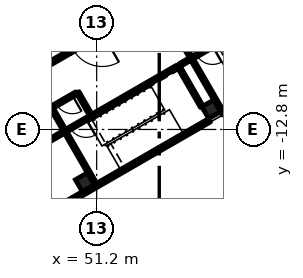
"""IFC4 building model, lengths in metres.
Left out: names, types, materials, properties, quantities, classifications, styles, units other than length and angle.
Written with IfcOpenShell. Run it as: python <this file> out.ifc"""

import sys

from ifc_helpers import new_model, si_unit, direction, frame, frame_2d, origin, origin_2d, place, context, subcontext, project, spatial, rectangle, extrude, element, fill, save


model = new_model("IFC4")
c1 = context("Model", 3, precision=1e-05, world=origin(), true_north=direction((0.0, 1.0)))
c2 = subcontext(c1, "Body", "Model", "MODEL_VIEW")
j1 = project(units=[si_unit("LENGTHUNIT", "METRE"), si_unit("PLANEANGLEUNIT", "RADIAN")], contexts=[c1])
p1 = place(None, origin())
s1 = spatial("IfcSite", under=j1, at=p1, CompositionType="ELEMENT")
p2 = place(p1, origin())
s2 = spatial("IfcBuilding", under=s1, at=p2, CompositionType="ELEMENT")
p3 = place(p2, frame((0.0, 0.0, 6.0)))
s3 = spatial("IfcBuildingStorey", under=s2, at=p3, CompositionType="ELEMENT", Elevation=6.0)
for number, where, z_axis, x_axis in (
    (1, (50.418, -16.271, 0.0), (0.0, 0.0, 1.0), (-0.5, 0.866, 0.0)),
    (2, (58.732, -11.471, 0.0), (0.0, 0.0, 1.0), (-0.5, 0.866, 0.0)),
):
    element("IfcColumn", number, at=place(p3, frame(where, z_axis=z_axis, x_axis=x_axis)), inside=s3, PredefinedType="COLUMN", context=c2, shape_type="SweptSolid", body=[
        extrude(rectangle(XDim=0.9, YDim=0.9, at=origin_2d()), origin(), (0.0, 0.0, 1.0), 5.4),
    ])
p4 = place(p3, frame((58.63, -12.194, 0.0), z_axis=(0.0, 0.0, 1.0), x_axis=(-0.866027159341, -0.499996959274, 0.0)))
e3 = element("IfcWall", 3, at=p4, inside=s3, PredefinedType="SOLIDWALL", context=c2, shape_type="SweptSolid", body=[
    extrude(rectangle(XDim=11.625, YDim=0.25, at=frame_2d((5.812, 0.0))), origin(), (0.0, 0.0, 1.0), 5.1),
])
p5 = place(p3, frame((66.944, -7.394, 0.0), z_axis=(0.0, 0.0, 1.0), x_axis=(-0.866033360935, -0.499986217557, 0.0)))
e4 = element("IfcWall", 4, at=p5, inside=s3, PredefinedType="SOLIDWALL", context=c2, shape_type="SweptSolid", body=[
    extrude(rectangle(XDim=8.6, YDim=0.25, at=frame_2d((4.3, 0.0))), origin(), (0.0, 0.0, 1.0), 5.1),
])
p6 = place(p3, frame((59.496, -11.694, 0.0), z_axis=(0.0, 0.0, 1.0), x_axis=(-0.865982457891, -0.500074377092, 0.0)))
e5 = element("IfcWall", 5, at=p6, inside=s3, PredefinedType="SOLIDWALL", context=c2, shape_type="SweptSolid", body=[
    extrude(rectangle(XDim=0.1, YDim=0.25, at=frame_2d((0.05, 0.0))), origin(), (0.0, 0.0, 1.0), 5.1),
])
p7 = place(p3, frame((51.119, -16.385, 0.0), z_axis=(0.0, 0.0, 1.0), x_axis=(-0.49999894854, 0.866026010844, 0.0)))
e6 = element("IfcWall", 6, at=p7, inside=s3, PredefinedType="SOLIDWALL", context=c2, shape_type="SweptSolid", body=[
    extrude(rectangle(XDim=4.0, YDim=0.2, at=frame_2d((2.0, 0.0))), origin(), (0.0, 0.0, 1.0), 5.1),
])
p8 = place(p3, frame((58.117, -11.306, 0.0), z_axis=(0.0, 0.0, 1.0), x_axis=(-0.499933790963, 0.866063626216, 0.0)))
e7 = element("IfcWall", 7, at=p8, inside=s3, PredefinedType="SOLIDWALL", context=c2, shape_type="SweptSolid", body=[
    extrude(rectangle(XDim=3.1, YDim=0.2, at=frame_2d((1.55, 0.0))), origin(), (0.0, 0.0, 1.0), 5.1),
])
p9 = place(p3, frame((59.433, -11.585, 0.0), z_axis=(0.0, 0.0, 1.0), x_axis=(-0.49999894854, 0.866026010844, 0.0)))
e8 = element("IfcWall", 8, at=p9, inside=s3, PredefinedType="SOLIDWALL", context=c2, shape_type="SweptSolid", body=[
    extrude(rectangle(XDim=4.0, YDim=0.2, at=frame_2d((2.0, 0.0))), origin(), (0.0, 0.0, 1.0), 5.1),
])
p10 = place(p3, frame((50.722, -11.996, 0.0), z_axis=(0.0, 0.0, 1.0), x_axis=(-0.866036909293, -0.499980071345, 0.0)))
e9 = element("IfcWall", 9, at=p10, inside=s3, PredefinedType="SOLIDWALL", context=c2, shape_type="SweptSolid", body=[
    extrude(rectangle(XDim=1.75, YDim=0.2, at=frame_2d((0.875, 0.0))), origin(), (0.0, 0.0, 1.0), 5.1),
])
p11 = place(p10, frame((0.25, 0.0, 0.0)))
e10 = element("IfcOpeningElement", 10, at=p11, cuts=e9, PredefinedType="OPENING", context=c2, shape_type="SweptSolid", body=[
    extrude(rectangle(XDim=1.2, YDim=2.1, at=frame_2d((0.6, 1.05))), frame((0.0, 0.11, 0.0), z_axis=(0.0, -1.0, 0.0), x_axis=(1.0, 0.0, 0.0)), (0.0, 0.0, 1.0), 0.22),
])
p12 = place(p3, frame((50.722, -11.996, 0.0), z_axis=(0.0, 0.0, 1.0), x_axis=(0.866027239912, 0.49999681972, 0.0)))
e11 = element("IfcWall", 11, at=p12, inside=s3, PredefinedType="SOLIDWALL", context=c2, shape_type="SweptSolid", body=[
    extrude(rectangle(XDim=6.65, YDim=0.2, at=frame_2d((3.325, 0.0))), origin(), (0.0, 0.0, 1.0), 5.1),
])
p13 = place(p3, frame((59.035, -7.196, 0.0), z_axis=(0.0, 0.0, 1.0), x_axis=(-0.866002029911, -0.500040482552, 0.0)))
e12 = element("IfcWall", 12, at=p13, inside=s3, PredefinedType="SOLIDWALL", context=c2, shape_type="SweptSolid", body=[
    extrude(rectangle(XDim=1.75, YDim=0.2, at=frame_2d((0.875, 0.0))), origin(), (0.0, 0.0, 1.0), 5.1),
])
p14 = place(p13, frame((0.25, 0.0, 0.0)))
e13 = element("IfcOpeningElement", 13, at=p14, cuts=e12, PredefinedType="OPENING", context=c2, shape_type="SweptSolid", body=[
    extrude(rectangle(XDim=1.2, YDim=2.1, at=frame_2d((0.6, 1.05))), frame((0.0, 0.11, 0.0), z_axis=(0.0, -1.0, 0.0), x_axis=(1.0, 0.0, 0.0)), (0.0, 0.0, 1.0), 0.22),
])
for number, where, z_axis, x_axis in (
    (14, (49.07, -12.835, 0.0), (0.0, 0.0, 1.0), (-0.5, 0.866, 0.0)),
    (15, (50.802, -11.835, 0.0), (0.0, 0.0, 1.0), (-0.5, 0.866, 0.0)),
):
    element("IfcWall", number, at=place(p3, frame(where, z_axis=z_axis, x_axis=x_axis)), inside=s3, PredefinedType="PARTITIONING", context=c2, shape_type="SweptSolid", body=[
        extrude(rectangle(XDim=1.7, YDim=0.2, at=frame_2d((0.85, 0.0))), origin(), (0.0, 0.0, 1.0), 4.5),
    ])
p15 = place(p3, frame((57.383, -8.035, 0.0), z_axis=(0.0, 0.0, 1.0), x_axis=(-0.500000056704, 0.866025371046, 0.0)))
e16 = element("IfcWall", 16, at=p15, inside=s3, PredefinedType="PARTITIONING", context=c2, shape_type="SweptSolid", body=[
    extrude(rectangle(XDim=1.7, YDim=0.2, at=frame_2d((0.85, 0.0))), origin(), (0.0, 0.0, 1.0), 4.5),
])
p16 = place(p3, frame((49.865, -10.413, 0.0), z_axis=(0.0, 0.0, 1.0), x_axis=(-0.866047807691, -0.499961193289, 0.0)))
e17 = element("IfcWall", 17, at=p16, inside=s3, PredefinedType="PARTITIONING", context=c2, shape_type="SweptSolid", body=[
    extrude(rectangle(XDim=1.8, YDim=0.2, at=frame_2d((0.9, 0.0))), origin(), (0.0, 0.0, 1.0), 4.5),
])
p17 = place(p16, frame((0.3, 0.0, 0.0)))
e18 = element("IfcOpeningElement", 18, at=p17, cuts=e17, PredefinedType="OPENING", context=c2, shape_type="SweptSolid", body=[
    extrude(rectangle(XDim=1.2, YDim=2.1, at=frame_2d((0.6, 1.05))), frame((0.0, 0.11, 0.0), z_axis=(0.0, -1.0, 0.0), x_axis=(1.0, 0.0, 0.0)), (0.0, 0.0, 1.0), 0.22),
])
p18 = place(p3, frame((44.507, -10.532, 0.0), z_axis=(0.0, 0.0, 1.0), x_axis=(0.866033658841, 0.49998570155, 0.0)))
e19 = element("IfcWall", 19, at=p18, inside=s3, PredefinedType="SOLIDWALL", context=c2, shape_type="SweptSolid", body=[
    extrude(rectangle(XDim=5.7, YDim=0.25, at=frame_2d((2.85, 0.0))), origin(), (0.0, 0.0, 1.0), 4.5),
])
p19 = place(p3, frame((51.782, -6.333, 0.0), z_axis=(0.0, 0.0, 1.0), x_axis=(-0.866019956843, -0.50000943426, 0.0)))
e20 = element("IfcWall", 20, at=p19, inside=s3, PredefinedType="SOLIDWALL", context=c2, shape_type="SweptSolid", body=[
    extrude(rectangle(XDim=2.7, YDim=0.25, at=frame_2d((1.35, 0.0))), origin(), (0.0, 0.0, 1.0), 4.5),
])
p20 = place(p19, frame((0.25, 0.0, 0.0)))
e21 = element("IfcOpeningElement", 21, at=p20, cuts=e20, PredefinedType="OPENING", context=c2, shape_type="SweptSolid", body=[
    extrude(rectangle(XDim=2.2, YDim=2.1, at=frame_2d((1.1, 1.05))), frame((0.0, 0.135, 0.0), z_axis=(0.0, -1.0, 0.0), x_axis=(1.0, 0.0, 0.0)), (0.0, 0.0, 1.0), 0.27),
])
p21 = place(p3, frame((46.5, -14.434, 0.0), z_axis=(0.0, 0.0, 1.0), x_axis=(0.866046596414, 0.499963291492, 0.0)))
e22 = element("IfcWall", 22, at=p21, inside=s3, PredefinedType="PARTITIONING", context=c2, shape_type="SweptSolid", body=[
    extrude(rectangle(XDim=2.925, YDim=0.2, at=frame_2d((1.462, 0.0))), origin(), (0.0, 0.0, 1.0), 4.5),
])
p22 = place(p3, frame((56.654, -8.571, 0.0), z_axis=(0.0, 0.0, 1.0), x_axis=(0.866094119867, 0.499880961361, 0.0)))
e23 = element("IfcWall", 23, at=p22, inside=s3, PredefinedType="PARTITIONING", context=c2, shape_type="SweptSolid", body=[
    extrude(rectangle(XDim=0.8, YDim=0.2, at=frame_2d((0.4, 0.0))), origin(), (0.0, 0.0, 1.0), 4.5),
])
p23 = place(p11, origin())
e24 = element("IfcDoor", 24, at=p23, inside=s3, OperationType="SINGLE_SWING_LEFT", PredefinedType="DOOR", context=c2, shape_type="SweptSolid", body=[
    extrude(rectangle(XDim=1.2, YDim=2.1, at=frame_2d((0.6, 1.05))), frame((0.0, 0.025, 0.0), z_axis=(0.0, -1.0, 0.0), x_axis=(1.0, 0.0, 0.0)), (0.0, 0.0, 1.0), 0.05),
])
fill(e10, e24)
p24 = place(p14, origin())
e25 = element("IfcDoor", 25, at=p24, inside=s3, OperationType="SINGLE_SWING_LEFT", PredefinedType="DOOR", context=c2, shape_type="SweptSolid", body=[
    extrude(rectangle(XDim=1.2, YDim=2.1, at=frame_2d((0.6, 1.05))), frame((0.0, 0.025, 0.0), z_axis=(0.0, -1.0, 0.0), x_axis=(1.0, 0.0, 0.0)), (0.0, 0.0, 1.0), 0.05),
])
fill(e13, e25)
p25 = place(p17, origin())
e26 = element("IfcDoor", 26, at=p25, inside=s3, OperationType="SINGLE_SWING_LEFT", PredefinedType="DOOR", context=c2, shape_type="SweptSolid", body=[
    extrude(rectangle(XDim=1.2, YDim=2.1, at=frame_2d((0.6, 1.05))), frame((0.0, 0.025, 0.0), z_axis=(0.0, -1.0, 0.0), x_axis=(1.0, 0.0, 0.0)), (0.0, 0.0, 1.0), 0.05),
])
fill(e18, e26)
save(model, sys.argv[1])
